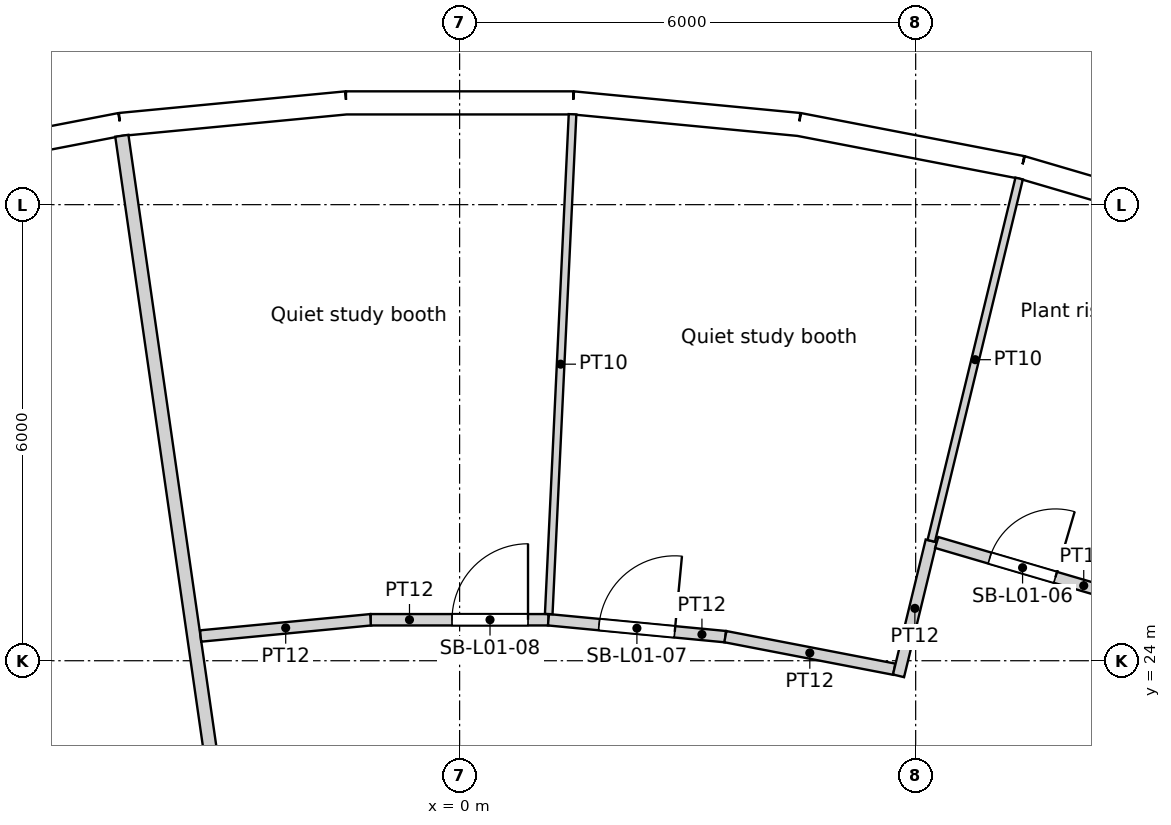
"""IFC4 building model, lengths in metres.
Left out: names, types, materials, properties, quantities, classifications, styles, units other than length and angle.
Written with IfcOpenShell. Run it as: python <this file> out.ifc"""

import sys

from ifc_helpers import new_model, si_unit, direction, frame, frame_2d, origin, origin_2d, place, context, subcontext, project, spatial, rectangle, circle, extrude, element, fill, save


model = new_model("IFC4")
c1 = context("Model", 3, precision=1e-05, world=origin(), true_north=direction((0.0, 1.0)))
c2 = subcontext(c1, "Body", "Model", "MODEL_VIEW")
j1 = project(units=[si_unit("LENGTHUNIT", "METRE"), si_unit("PLANEANGLEUNIT", "RADIAN")], contexts=[c1])
p1 = place(None, origin())
s1 = spatial("IfcSite", under=j1, at=p1, CompositionType="ELEMENT")
p2 = place(p1, origin())
s2 = spatial("IfcBuilding", under=s1, at=p2, CompositionType="ELEMENT")
p3 = place(p2, frame((0.0, 0.0, 9.0)))
s3 = spatial("IfcBuildingStorey", under=s2, at=p3, CompositionType="ELEMENT", Elevation=9.0)
for number, where, z_axis, x_axis in (
    (1, (7.137, 29.421, 0.0), (0.0, 0.0, 1.0), (1.0, 0.0, 0.0)),
    (2, (1.44, 30.24, 0.0), (0.0, 0.0, 1.0), (1.0, 0.0, 0.0)),
    (3, (-4.309, 29.966, 0.0), (0.0, 0.0, 1.0), (1.0, 0.0, 0.0)),
):
    element("IfcColumn", number, at=place(p3, frame(where, z_axis=z_axis, x_axis=x_axis)), inside=s3, PredefinedType="COLUMN", context=c2, shape_type="SweptSolid", body=[
        extrude(circle(Radius=0.7, at=origin_2d()), origin(), (0.0, 0.0, 1.0), 4.8),
    ])
for number, where, z_axis, x_axis in (
    (4, (4.263, 24.175, 0.0), (0.0, 0.0, 1.0), (1.0, 0.0, 0.0)),
    (5, (-1.427, 24.506, 0.0), (0.0, 0.0, 1.0), (1.0, 0.0, 0.0)),
):
    element("IfcColumn", number, at=place(p3, frame(where, z_axis=z_axis, x_axis=x_axis)), inside=s3, PredefinedType="COLUMN", context=c2, shape_type="SweptSolid", body=[
        extrude(circle(Radius=0.75, at=origin_2d()), origin(), (0.0, 0.0, 1.0), 4.8),
    ])
p4 = place(p3, frame((10.261, 29.649, 0.0), z_axis=(0.0, 0.0, 1.0), x_axis=(-0.959502108153, 0.281701445593, 0.0)))
e6 = element("IfcWall", 6, at=p4, inside=s3, PredefinedType="SOLIDWALL", context=c2, shape_type="SweptSolid", body=[
    extrude(rectangle(XDim=2.986, YDim=0.3, at=frame_2d((1.493, 0.0))), origin(), (0.0, 0.0, 1.0), 4.35),
])
p5 = place(p4, frame((1.493, 0.0, 2.0)))
e7 = element("IfcOpeningElement", 7, at=p5, cuts=e6, PredefinedType="OPENING", context=c2, shape_type="SweptSolid", body=[
    extrude(circle(Radius=1.2, at=origin_2d()), frame((0.0, 0.16, 0.0), z_axis=(0.0, -1.0, 0.0), x_axis=(1.0, 0.0, 0.0)), (0.0, 0.0, 1.0), 0.32),
])
p6 = place(p3, frame((7.397, 30.49, 0.0), z_axis=(0.0, 0.0, 1.0), x_axis=(-0.981918853666, 0.189302310646, 0.0)))
e8 = element("IfcWall", 8, at=p6, inside=s3, PredefinedType="SOLIDWALL", context=c2, shape_type="SweptSolid", body=[
    extrude(rectangle(XDim=2.986, YDim=0.3, at=frame_2d((1.493, 0.0))), origin(), (0.0, 0.0, 1.0), 4.35),
])
p7 = place(p6, frame((1.493, 0.0, 2.0)))
e9 = element("IfcOpeningElement", 9, at=p7, cuts=e8, PredefinedType="OPENING", context=c2, shape_type="SweptSolid", body=[
    extrude(circle(Radius=1.2, at=origin_2d()), frame((0.0, 0.16, 0.0), z_axis=(0.0, -1.0, 0.0), x_axis=(1.0, 0.0, 0.0)), (0.0, 0.0, 1.0), 0.32),
])
p8 = place(p3, frame((4.465, 31.055, 0.0), z_axis=(0.0, 0.0, 1.0), x_axis=(-0.99547560533, 0.095017467833, 0.0)))
e10 = element("IfcWall", 10, at=p8, inside=s3, PredefinedType="SOLIDWALL", context=c2, shape_type="SweptSolid", body=[
    extrude(rectangle(XDim=2.986, YDim=0.3, at=frame_2d((1.493, 0.0))), origin(), (0.0, 0.0, 1.0), 4.35),
])
p9 = place(p8, frame((1.493, 0.0, 2.0)))
e11 = element("IfcOpeningElement", 11, at=p9, cuts=e10, PredefinedType="OPENING", context=c2, shape_type="SweptSolid", body=[
    extrude(circle(Radius=1.2, at=origin_2d()), frame((0.0, 0.16, 0.0), z_axis=(0.0, -1.0, 0.0), x_axis=(1.0, 0.0, 0.0)), (0.0, 0.0, 1.0), 0.32),
])
p10 = place(p3, frame((1.493, 31.339, 0.0), z_axis=(0.0, 0.0, 1.0), x_axis=(-1.0, 0.0, 0.0)))
e12 = element("IfcWall", 12, at=p10, inside=s3, PredefinedType="SOLIDWALL", context=c2, shape_type="SweptSolid", body=[
    extrude(rectangle(XDim=2.986, YDim=0.3, at=frame_2d((1.493, 0.0))), origin(), (0.0, 0.0, 1.0), 4.35),
])
p11 = place(p10, frame((1.493, 0.0, 2.0)))
e13 = element("IfcOpeningElement", 13, at=p11, cuts=e12, PredefinedType="OPENING", context=c2, shape_type="SweptSolid", body=[
    extrude(circle(Radius=1.2, at=origin_2d()), frame((0.0, 0.16, 0.0), z_axis=(0.0, -1.0, 0.0), x_axis=(1.0, 0.0, 0.0)), (0.0, 0.0, 1.0), 0.32),
])
p12 = place(p3, frame((-1.493, 31.339, 0.0), z_axis=(0.0, 0.0, 1.0), x_axis=(-0.99547560533, -0.095017467833, 0.0)))
e14 = element("IfcWall", 14, at=p12, inside=s3, PredefinedType="SOLIDWALL", context=c2, shape_type="SweptSolid", body=[
    extrude(rectangle(XDim=2.986, YDim=0.3, at=frame_2d((1.493, 0.0))), origin(), (0.0, 0.0, 1.0), 4.35),
])
p13 = place(p12, frame((1.493, 0.0, 2.0)))
e15 = element("IfcOpeningElement", 15, at=p13, cuts=e14, PredefinedType="OPENING", context=c2, shape_type="SweptSolid", body=[
    extrude(circle(Radius=1.2, at=origin_2d()), frame((0.0, 0.16, 0.0), z_axis=(0.0, -1.0, 0.0), x_axis=(1.0, 0.0, 0.0)), (0.0, 0.0, 1.0), 0.32),
])
p14 = place(p3, frame((-4.465, 31.055, 0.0), z_axis=(0.0, 0.0, 1.0), x_axis=(-0.981918853666, -0.189302310646, 0.0)))
e16 = element("IfcWall", 16, at=p14, inside=s3, PredefinedType="SOLIDWALL", context=c2, shape_type="SweptSolid", body=[
    extrude(rectangle(XDim=2.986, YDim=0.3, at=frame_2d((1.493, 0.0))), origin(), (0.0, 0.0, 1.0), 4.35),
])
p15 = place(p14, frame((1.493, 0.0, 2.0)))
e17 = element("IfcOpeningElement", 17, at=p15, cuts=e16, PredefinedType="OPENING", context=c2, shape_type="SweptSolid", body=[
    extrude(circle(Radius=1.2, at=origin_2d()), frame((0.0, 0.16, 0.0), z_axis=(0.0, -1.0, 0.0), x_axis=(1.0, 0.0, 0.0)), (0.0, 0.0, 1.0), 0.32),
])
p16 = place(p3, frame((-4.444, 30.906, 0.0), z_axis=(0.0, 0.0, 1.0), x_axis=(0.142304751751, -0.989822892051, 0.0)))
e18 = element("IfcWall", 18, at=p16, inside=s3, PredefinedType="PARTITIONING", context=c2, shape_type="SweptSolid", body=[
    extrude(rectangle(XDim=18.609, YDim=0.175, at=frame_2d((9.305, 0.0))), origin(), (0.0, 0.0, 1.0), 3.75),
])
p17 = place(p3, frame((-1.169, 24.539, 0.0), z_axis=(0.0, 0.0, 1.0), x_axis=(-0.995476420249, -0.095008929725, 0.0)))
e19 = element("IfcWall", 19, at=p17, inside=s3, PredefinedType="PARTITIONING", context=c2, shape_type="SweptSolid", body=[
    extrude(rectangle(XDim=2.249, YDim=0.15, at=frame_2d((1.124, 0.0))), origin(), (0.0, 0.0, 1.0), 3.75),
])
p18 = place(p3, frame((-1.169, 24.539, 0.0), z_axis=(0.0, 0.0, 1.0), x_axis=(1.0, 0.0, 0.0)))
e20 = element("IfcWall", 20, at=p18, inside=s3, PredefinedType="PARTITIONING", context=c2, shape_type="SweptSolid", body=[
    extrude(rectangle(XDim=2.338, YDim=0.15, at=frame_2d((1.169, 0.0))), origin(), (0.0, 0.0, 1.0), 3.75),
])
p19 = place(p18, frame((1.069, 0.0, 0.0)))
e21 = element("IfcOpeningElement", 21, at=p19, cuts=e20, PredefinedType="OPENING", context=c2, shape_type="SweptSolid", body=[
    extrude(rectangle(XDim=1.0, YDim=2.1, at=frame_2d((0.5, 1.05))), frame((0.0, 0.075, 0.0), z_axis=(0.0, -1.0, 0.0), x_axis=(1.0, 0.0, 0.0)), (0.0, 0.0, 1.0), 0.15),
])
p20 = place(p3, frame((1.486, 31.189, 0.0), z_axis=(0.0, 0.0, 1.0), x_axis=(-0.047549289688, -0.998868892823, 0.0)))
e22 = element("IfcWall", 22, at=p20, inside=s3, PredefinedType="PARTITIONING", context=c2, shape_type="SweptSolid", body=[
    extrude(rectangle(XDim=6.582, YDim=0.1, at=frame_2d((3.291, 0.0))), origin(), (0.0, 0.0, 1.0), 3.75),
])
p21 = place(p3, frame((1.169, 24.539, 0.0), z_axis=(0.0, 0.0, 1.0), x_axis=(0.995473855736, -0.095035796131, 0.0)))
e23 = element("IfcWall", 23, at=p21, inside=s3, PredefinedType="PARTITIONING", context=c2, shape_type="SweptSolid", body=[
    extrude(rectangle(XDim=2.338, YDim=0.15, at=frame_2d((1.169, 0.0))), origin(), (0.0, 0.0, 1.0), 3.75),
])
p22 = place(p21, frame((0.669, 0.0, 0.0)))
e24 = element("IfcOpeningElement", 24, at=p22, cuts=e23, PredefinedType="OPENING", context=c2, shape_type="SweptSolid", body=[
    extrude(rectangle(XDim=1.0, YDim=2.1, at=frame_2d((0.5, 1.05))), frame((0.0, 0.075, 0.0), z_axis=(0.0, -1.0, 0.0), x_axis=(1.0, 0.0, 0.0)), (0.0, 0.0, 1.0), 0.15),
])
p23 = place(p3, frame((5.718, 23.888, 0.0), z_axis=(0.0, 0.0, 1.0), x_axis=(-0.981934043808, 0.18922350174, 0.0)))
e25 = element("IfcWall", 25, at=p23, inside=s3, PredefinedType="PARTITIONING", context=c2, shape_type="SweptSolid", body=[
    extrude(rectangle(XDim=2.263, YDim=0.15, at=frame_2d((1.131, 0.0))), origin(), (0.0, 0.0, 1.0), 3.75),
])
p24 = place(p3, frame((6.205, 25.577, 0.0), z_axis=(0.0, 0.0, 1.0), x_axis=(-0.235707106262, -0.9718241405, 0.0)))
e26 = element("IfcWall", 26, at=p24, inside=s3, PredefinedType="PARTITIONING", context=c2, shape_type="SweptSolid", body=[
    extrude(rectangle(XDim=1.827, YDim=0.15, at=frame_2d((0.914, 0.0))), origin(), (0.0, 0.0, 1.0), 3.75),
])
p25 = place(p3, frame((7.361, 30.344, 0.0), z_axis=(0.0, 0.0, 1.0), x_axis=(-0.235760987456, -0.971811070524, 0.0)))
e27 = element("IfcWall", 27, at=p25, inside=s3, PredefinedType="PARTITIONING", context=c2, shape_type="SweptSolid", body=[
    extrude(rectangle(XDim=4.905, YDim=0.1, at=frame_2d((2.453, 0.0))), origin(), (0.0, 0.0, 1.0), 3.75),
])
p26 = place(p3, frame((6.277, 25.556, 0.0), z_axis=(0.0, 0.0, 1.0), x_axis=(0.959490897596, -0.281739627015, 0.0)))
e28 = element("IfcWall", 28, at=p26, inside=s3, PredefinedType="PARTITIONING", context=c2, shape_type="SweptSolid", body=[
    extrude(rectangle(XDim=2.354, YDim=0.15, at=frame_2d((1.177, 0.0))), origin(), (0.0, 0.0, 1.0), 3.75),
])
p27 = place(p26, frame((0.727, 0.0, 0.0)))
e29 = element("IfcOpeningElement", 29, at=p27, cuts=e28, PredefinedType="OPENING", context=c2, shape_type="SweptSolid", body=[
    extrude(rectangle(XDim=0.9, YDim=2.1, at=frame_2d((0.45, 1.05))), frame((0.0, 0.075, 0.0), z_axis=(0.0, -1.0, 0.0), x_axis=(1.0, 0.0, 0.0)), (0.0, 0.0, 1.0), 0.15),
])
p28 = place(p5, origin())
e30 = element("IfcWindow", 30, at=p28, inside=s3, PartitioningType="SINGLE_PANEL", PredefinedType="WINDOW", context=c2, shape_type="SweptSolid", body=[
    extrude(circle(Radius=1.2, at=origin_2d()), frame((0.0, 0.12, 0.0), z_axis=(0.0, -1.0, 0.0), x_axis=(1.0, 0.0, 0.0)), (0.0, 0.0, 1.0), 0.1),
])
fill(e7, e30)
p29 = place(p7, origin())
e31 = element("IfcWindow", 31, at=p29, inside=s3, PartitioningType="SINGLE_PANEL", PredefinedType="WINDOW", context=c2, shape_type="SweptSolid", body=[
    extrude(circle(Radius=1.2, at=origin_2d()), frame((0.0, 0.12, 0.0), z_axis=(0.0, -1.0, 0.0), x_axis=(1.0, 0.0, 0.0)), (0.0, 0.0, 1.0), 0.1),
])
fill(e9, e31)
p30 = place(p9, origin())
e32 = element("IfcWindow", 32, at=p30, inside=s3, PartitioningType="SINGLE_PANEL", PredefinedType="WINDOW", context=c2, shape_type="SweptSolid", body=[
    extrude(circle(Radius=1.2, at=origin_2d()), frame((0.0, 0.12, 0.0), z_axis=(0.0, -1.0, 0.0), x_axis=(1.0, 0.0, 0.0)), (0.0, 0.0, 1.0), 0.1),
])
fill(e11, e32)
p31 = place(p11, origin())
e33 = element("IfcWindow", 33, at=p31, inside=s3, PartitioningType="SINGLE_PANEL", PredefinedType="WINDOW", context=c2, shape_type="SweptSolid", body=[
    extrude(circle(Radius=1.2, at=origin_2d()), frame((0.0, 0.12, 0.0), z_axis=(0.0, -1.0, 0.0), x_axis=(1.0, 0.0, 0.0)), (0.0, 0.0, 1.0), 0.1),
])
fill(e13, e33)
p32 = place(p13, origin())
e34 = element("IfcWindow", 34, at=p32, inside=s3, PartitioningType="SINGLE_PANEL", PredefinedType="WINDOW", context=c2, shape_type="SweptSolid", body=[
    extrude(circle(Radius=1.2, at=origin_2d()), frame((0.0, 0.12, 0.0), z_axis=(0.0, -1.0, 0.0), x_axis=(1.0, 0.0, 0.0)), (0.0, 0.0, 1.0), 0.1),
])
fill(e15, e34)
p33 = place(p15, origin())
e35 = element("IfcWindow", 35, at=p33, inside=s3, PartitioningType="SINGLE_PANEL", PredefinedType="WINDOW", context=c2, shape_type="SweptSolid", body=[
    extrude(circle(Radius=1.2, at=origin_2d()), frame((0.0, 0.12, 0.0), z_axis=(0.0, -1.0, 0.0), x_axis=(1.0, 0.0, 0.0)), (0.0, 0.0, 1.0), 0.1),
])
fill(e17, e35)
p34 = place(p27, origin())
e36 = element("IfcDoor", 36, at=p34, inside=s3, OperationType="SINGLE_SWING_RIGHT", PredefinedType="DOOR", context=c2, shape_type="SweptSolid", body=[
    extrude(rectangle(XDim=0.9, YDim=2.1, at=frame_2d((0.45, 1.05))), frame((0.0, 0.025, 0.0), z_axis=(0.0, -1.0, 0.0), x_axis=(1.0, 0.0, 0.0)), (0.0, 0.0, 1.0), 0.05),
])
fill(e29, e36)
p35 = place(p22, origin())
e37 = element("IfcDoor", 37, at=p35, inside=s3, OperationType="SINGLE_SWING_RIGHT", PredefinedType="DOOR", context=c2, shape_type="SweptSolid", body=[
    extrude(rectangle(XDim=1.0, YDim=2.1, at=frame_2d((0.5, 1.05))), frame((0.0, 0.025, 0.0), z_axis=(0.0, -1.0, 0.0), x_axis=(1.0, 0.0, 0.0)), (0.0, 0.0, 1.0), 0.05),
])
fill(e24, e37)
p36 = place(p19, origin())
e38 = element("IfcDoor", 38, at=p36, inside=s3, OperationType="SINGLE_SWING_RIGHT", PredefinedType="DOOR", context=c2, shape_type="SweptSolid", body=[
    extrude(rectangle(XDim=1.0, YDim=2.1, at=frame_2d((0.5, 1.05))), frame((0.0, 0.025, 0.0), z_axis=(0.0, -1.0, 0.0), x_axis=(1.0, 0.0, 0.0)), (0.0, 0.0, 1.0), 0.05),
])
fill(e21, e38)
save(model, sys.argv[1])
